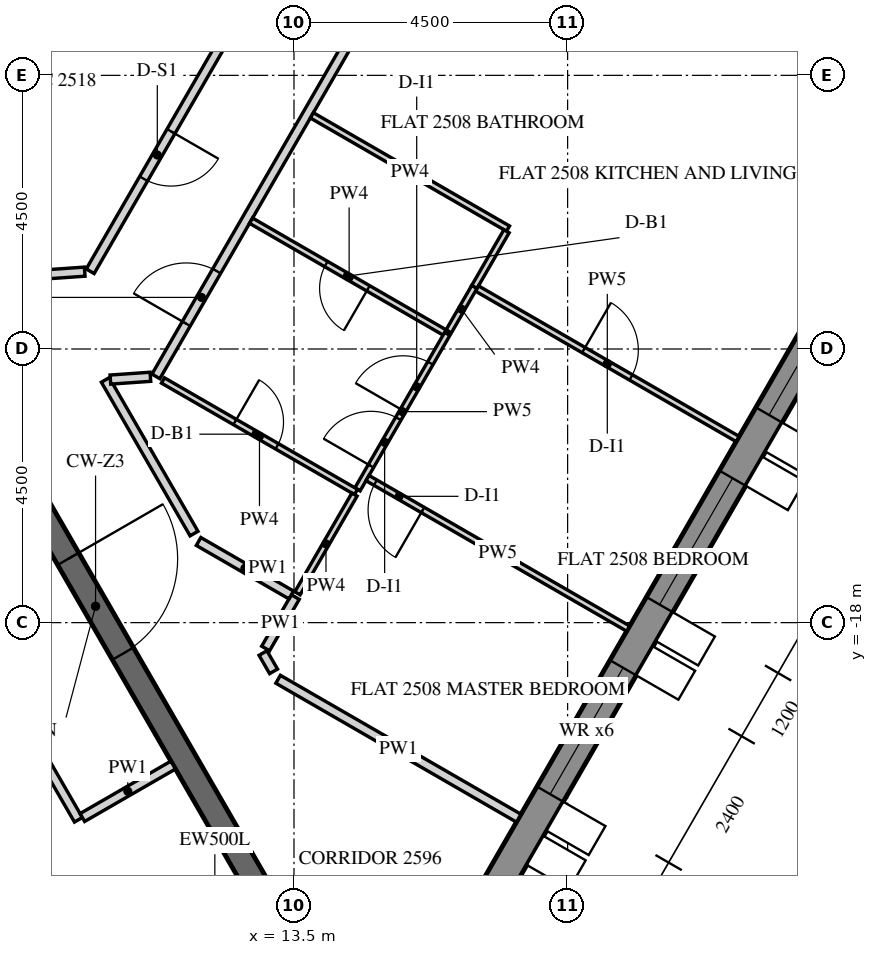
"""IFC4 building model, lengths in metres.
Left out: names, types, materials, properties, quantities, classifications, styles, units other than length and angle.
Written with IfcOpenShell. Run it as: python <this file> out.ifc"""

import sys

from ifc_helpers import new_model, si_unit, direction, frame, frame_2d, origin, place, context, subcontext, project, spatial, polyline, rectangle, outline, extrude, element, fill, save


model = new_model("IFC4")
c1 = context("Model", 3, precision=1e-05, world=origin(), true_north=direction((0.0, 1.0)))
c2 = subcontext(c1, "Body", "Model", "MODEL_VIEW")
j1 = project(units=[si_unit("LENGTHUNIT", "METRE"), si_unit("PLANEANGLEUNIT", "RADIAN")], contexts=[c1])
p1 = place(None, origin())
s1 = spatial("IfcSite", under=j1, at=p1, CompositionType="ELEMENT")
p2 = place(p1, origin())
s2 = spatial("IfcBuilding", under=s1, at=p2, CompositionType="ELEMENT")
p3 = place(p2, frame((0.0, 0.0, 314.7)))
s3 = spatial("IfcBuildingStorey", under=s2, at=p3, CompositionType="ELEMENT", Elevation=314.7)
p4 = place(p3, frame((16.451, -23.005, -0.15), z_axis=(0.0, 0.0, 1.0), x_axis=(0.500003737743, 0.866023245787, 0.0)))
e1 = element("IfcWall", 1, at=p4, inside=s3, PredefinedType="SOLIDWALL", context=c2, shape_type="SweptSolid", body=[
    extrude(outline(polyline([(-0.021, -0.25), (25.468, -0.25), (25.421, 0.25), (0.021, 0.25), (-0.021, -0.25)])), origin(), (0.0, 0.0, 1.0), 3.9),
])
p5 = place(p4, frame((2.522, 0.0, 0.75)))
e2 = element("IfcOpeningElement", 2, at=p5, cuts=e1, PredefinedType="OPENING", context=c2, shape_type="SweptSolid", body=[
    extrude(rectangle(XDim=2.4, YDim=2.7, at=frame_2d((1.2, 1.35))), frame((0.0, 0.26, 0.0), z_axis=(0.0, -1.0, 0.0), x_axis=(1.0, 0.0, 0.0)), (0.0, 0.0, 1.0), 0.52),
])
p6 = place(p4, frame((6.122, 0.0, 0.75)))
e3 = element("IfcOpeningElement", 3, at=p6, cuts=e1, PredefinedType="OPENING", context=c2, shape_type="SweptSolid", body=[
    extrude(rectangle(XDim=2.4, YDim=2.7, at=frame_2d((1.2, 1.35))), frame((0.0, 0.26, 0.0), z_axis=(0.0, -1.0, 0.0), x_axis=(1.0, 0.0, 0.0)), (0.0, 0.0, 1.0), 0.52),
])
p7 = place(p4, frame((9.722, 0.0, 0.75)))
e4 = element("IfcOpeningElement", 4, at=p7, cuts=e1, PredefinedType="OPENING", context=c2, shape_type="SweptSolid", body=[
    extrude(rectangle(XDim=2.4, YDim=2.7, at=frame_2d((1.2, 1.35))), frame((0.0, 0.26, 0.0), z_axis=(0.0, -1.0, 0.0), x_axis=(1.0, 0.0, 0.0)), (0.0, 0.0, 1.0), 0.52),
])
p8 = place(p4, frame((13.323, 0.0, 0.75)))
e5 = element("IfcOpeningElement", 5, at=p8, cuts=e1, PredefinedType="OPENING", context=c2, shape_type="SweptSolid", body=[
    extrude(rectangle(XDim=2.4, YDim=2.7, at=frame_2d((1.2, 1.35))), frame((0.0, 0.26, 0.0), z_axis=(0.0, -1.0, 0.0), x_axis=(1.0, 0.0, 0.0)), (0.0, 0.0, 1.0), 0.52),
])
p9 = place(p4, frame((16.922, 0.0, 0.75)))
e6 = element("IfcOpeningElement", 6, at=p9, cuts=e1, PredefinedType="OPENING", context=c2, shape_type="SweptSolid", body=[
    extrude(rectangle(XDim=2.4, YDim=2.7, at=frame_2d((1.2, 1.35))), frame((0.0, 0.26, 0.0), z_axis=(0.0, -1.0, 0.0), x_axis=(1.0, 0.0, 0.0)), (0.0, 0.0, 1.0), 0.52),
])
p10 = place(p4, frame((20.522, 0.0, 0.75)))
e7 = element("IfcOpeningElement", 7, at=p10, cuts=e1, PredefinedType="OPENING", context=c2, shape_type="SweptSolid", body=[
    extrude(rectangle(XDim=2.4, YDim=2.7, at=frame_2d((1.2, 1.35))), frame((0.0, 0.26, 0.0), z_axis=(0.0, -1.0, 0.0), x_axis=(1.0, 0.0, 0.0)), (0.0, 0.0, 1.0), 0.52),
])
p11 = place(p3, frame((6.235, -10.8, -0.15), z_axis=(0.0, 0.0, 1.0), x_axis=(0.499996419489, 0.866027470984, 0.0)))
e8 = element("IfcWall", 8, at=p11, inside=s3, PredefinedType="SHEAR", context=c2, shape_type="SweptSolid", body=[
    extrude(outline(polyline([(-0.115, -0.2), (12.586, -0.2), (12.355, 0.2), (0.115, 0.2), (-0.115, -0.2)])), origin(), (0.0, 0.0, 1.0), 3.9),
])
p12 = place(p11, frame((5.364, 0.0, 0.15)))
e9 = element("IfcOpeningElement", 9, at=p12, cuts=e8, PredefinedType="OPENING", context=c2, shape_type="SweptSolid", body=[
    extrude(rectangle(XDim=1.8, YDim=2.4, at=frame_2d((0.9, 1.2))), frame((0.0, 0.21, 0.0), z_axis=(0.0, -1.0, 0.0), x_axis=(1.0, 0.0, 0.0)), (0.0, 0.0, 1.0), 0.42),
])
p13 = place(p3, frame((6.351, -11.0, -0.15), z_axis=(0.0, 0.0, 1.0), x_axis=(0.499998894578, -0.866026041999, 0.0)))
e10 = element("IfcWall", 10, at=p13, inside=s3, PredefinedType="SHEAR", context=c2, shape_type="SweptSolid", body=[
    extrude(rectangle(XDim=15.544, YDim=0.4, at=frame_2d((7.772, 0.0))), origin(), (0.0, 0.0, 1.0), 3.9),
])
p14 = place(p13, frame((6.872, 0.0, 0.15)))
e11 = element("IfcOpeningElement", 11, at=p14, cuts=e10, PredefinedType="OPENING", context=c2, shape_type="SweptSolid", body=[
    extrude(rectangle(XDim=1.8, YDim=2.4, at=frame_2d((0.9, 1.2))), frame((0.0, 0.21, 0.0), z_axis=(0.0, -1.0, 0.0), x_axis=(1.0, 0.0, 0.0)), (0.0, 0.0, 1.0), 0.42),
])
p15 = place(p3, frame((6.0, -14.392, 0.0), z_axis=(0.0, 0.0, 1.0), x_axis=(0.499999400414, -0.866025749955, 0.0)))
e12 = element("IfcWall", 12, at=p15, inside=s3, PredefinedType="PARTITIONING", context=c2, shape_type="SweptSolid", body=[
    extrude(rectangle(XDim=7.911, YDim=0.15, at=frame_2d((3.955, 0.0))), origin(), (0.0, 0.0, 1.0), 2.988),
])
p16 = place(p3, frame((10.02, -21.205, 0.0), z_axis=(0.0, 0.0, 1.0), x_axis=(0.866074815912, 0.499914405916, 0.0)))
e13 = element("IfcWall", 13, at=p16, inside=s3, PredefinedType="PARTITIONING", context=c2, shape_type="SweptSolid", body=[
    extrude(rectangle(XDim=1.725, YDim=0.15, at=frame_2d((0.862, 0.0))), origin(), (0.0, 0.0, 1.0), 2.988),
])
p17 = place(p3, frame((11.229, -13.951, 0.0), z_axis=(0.0, 0.0, 1.0), x_axis=(0.499997948852, 0.866026588012, 0.0)))
e14 = element("IfcWall", 14, at=p17, inside=s3, PredefinedType="PARTITIONING", context=c2, shape_type="SweptSolid", body=[
    extrude(rectangle(XDim=14.677, YDim=0.15, at=frame_2d((7.339, 0.0))), origin(), (0.0, 0.0, 1.0), 2.988),
])
p18 = place(p17, frame((1.0, 0.0, 0.0)))
e15 = element("IfcOpeningElement", 15, at=p18, cuts=e14, PredefinedType="OPENING", context=c2, shape_type="SweptSolid", body=[
    extrude(rectangle(XDim=1.0, YDim=2.1, at=frame_2d((0.5, 1.05))), frame((0.0, 0.085, 0.0), z_axis=(0.0, -1.0, 0.0), x_axis=(1.0, 0.0, 0.0)), (0.0, 0.0, 1.0), 0.17),
])
p19 = place(p17, frame((13.527, 0.0, 0.0)))
e16 = element("IfcOpeningElement", 16, at=p19, cuts=e14, PredefinedType="OPENING", context=c2, shape_type="SweptSolid", body=[
    extrude(rectangle(XDim=1.0, YDim=2.1, at=frame_2d((0.5, 1.05))), frame((0.0, 0.085, 0.0), z_axis=(0.0, -1.0, 0.0), x_axis=(1.0, 0.0, 0.0)), (0.0, 0.0, 1.0), 0.17),
])
p20 = place(p3, frame((17.196, -21.216, 0.0), z_axis=(0.0, 0.0, 1.0), x_axis=(-0.866028083473, 0.499995358614, 0.0)))
e17 = element("IfcWall", 17, at=p20, inside=s3, PredefinedType="PARTITIONING", context=c2, shape_type="SweptSolid", body=[
    extrude(rectangle(XDim=4.569, YDim=0.15, at=frame_2d((2.284, 0.0))), origin(), (0.0, 0.0, 1.0), 2.988),
])
p21 = place(p3, frame((13.164, -18.801, 0.0), z_axis=(0.0, 0.0, 1.0), x_axis=(-0.499762962979, 0.866162213927, 0.0)))
e18 = element("IfcWall", 18, at=p21, inside=s3, PredefinedType="PARTITIONING", context=c2, shape_type="SweptSolid", body=[
    extrude(rectangle(XDim=0.348, YDim=0.15, at=frame_2d((0.174, 0.0))), origin(), (0.0, 0.0, 1.0), 2.988),
])
p22 = place(p3, frame((13.034, -18.425, 0.0), z_axis=(0.0, 0.0, 1.0), x_axis=(0.500011000363, 0.866019052629, 0.0)))
e19 = element("IfcWall", 19, at=p22, inside=s3, PredefinedType="PARTITIONING", context=c2, shape_type="SweptSolid", body=[
    extrude(rectangle(XDim=0.977, YDim=0.15, at=frame_2d((0.488, 0.0))), origin(), (0.0, 0.0, 1.0), 2.988),
])
p23 = place(p3, frame((13.455, -17.545, 0.0), z_axis=(0.0, 0.0, 1.0), x_axis=(-0.866074688284, 0.499914627025, 0.0)))
e20 = element("IfcWall", 20, at=p23, inside=s3, PredefinedType="PARTITIONING", context=c2, shape_type="SweptSolid", body=[
    extrude(rectangle(XDim=1.76, YDim=0.15, at=frame_2d((0.88, 0.0))), origin(), (0.0, 0.0, 1.0), 2.988),
])
p24 = place(p3, frame((11.856, -16.536, 0.0), z_axis=(0.0, 0.0, 1.0), x_axis=(-0.49996389635, 0.866046247233, 0.0)))
e21 = element("IfcWall", 21, at=p24, inside=s3, PredefinedType="PARTITIONING", context=c2, shape_type="SweptSolid", body=[
    extrude(rectangle(XDim=2.918, YDim=0.15, at=frame_2d((1.459, 0.0))), origin(), (0.0, 0.0, 1.0), 2.988),
])
p25 = place(p3, frame((10.481, -14.003, 0.0), z_axis=(0.0, 0.0, 1.0), x_axis=(0.997577490052, 0.06956400895, 0.0)))
e22 = element("IfcWall", 22, at=p25, inside=s3, PredefinedType="PARTITIONING", context=c2, shape_type="SweptSolid", body=[
    extrude(rectangle(XDim=0.66, YDim=0.15, at=frame_2d((0.33, 0.0))), origin(), (0.0, 0.0, 1.0), 2.988),
])
p26 = place(p3, frame((12.356, -8.399, 0.0), z_axis=(0.0, 0.0, 1.0), x_axis=(-0.499993756358, -0.866029008523, 0.0)))
e23 = element("IfcWall", 23, at=p26, inside=s3, PredefinedType="PARTITIONING", context=c2, shape_type="SweptSolid", body=[
    extrude(rectangle(XDim=4.414, YDim=0.15, at=frame_2d((2.207, 0.0))), origin(), (0.0, 0.0, 1.0), 2.988),
])
p27 = place(p26, frame((1.757, 0.0, 0.0)))
e24 = element("IfcOpeningElement", 24, at=p27, cuts=e23, PredefinedType="OPENING", context=c2, shape_type="SweptSolid", body=[
    extrude(rectangle(XDim=0.9, YDim=2.1, at=frame_2d((0.45, 1.05))), frame((0.0, 0.085, 0.0), z_axis=(0.0, -1.0, 0.0), x_axis=(1.0, 0.0, 0.0)), (0.0, 0.0, 1.0), 0.17),
])
p28 = place(p3, frame((10.059, -12.228, 0.0), z_axis=(0.0, 0.0, 1.0), x_axis=(-0.99755845504, -0.069836443057, 0.0)))
e25 = element("IfcWall", 25, at=p28, inside=s3, PredefinedType="PARTITIONING", context=c2, shape_type="SweptSolid", body=[
    extrude(rectangle(XDim=0.664, YDim=0.15, at=frame_2d((0.332, 0.0))), origin(), (0.0, 0.0, 1.0), 2.988),
])
p29 = place(p3, frame((13.794, -9.658, 0.0), z_axis=(0.0, 0.0, 1.0), x_axis=(0.866028424924, -0.499994767197, 0.0)))
e26 = element("IfcWall", 26, at=p29, inside=s3, PredefinedType="PARTITIONING", context=c2, shape_type="SweptSolid", body=[
    extrude(rectangle(XDim=3.725, YDim=0.1, at=frame_2d((1.863, 0.0))), origin(), (0.0, 0.0, 1.0), 2.988),
])
p30 = place(p3, frame((16.995, -11.564, 0.0), z_axis=(0.0, 0.0, 1.0), x_axis=(-0.50002815445, -0.866009148195, 0.0)))
e27 = element("IfcWall", 27, at=p30, inside=s3, PredefinedType="PARTITIONING", context=c2, shape_type="SweptSolid", body=[
    extrude(rectangle(XDim=1.06, YDim=0.1, at=frame_2d((0.53, 0.0))), origin(), (0.0, 0.0, 1.0), 2.988),
])
p31 = place(p3, frame((16.509, -12.505, 0.0), z_axis=(0.0, 0.0, 1.0), x_axis=(0.866018855338, -0.500011342071, 0.0)))
e28 = element("IfcWall", 28, at=p31, inside=s3, PredefinedType="PARTITIONING", context=c2, shape_type="SweptSolid", body=[
    extrude(rectangle(XDim=4.95, YDim=0.1, at=frame_2d((2.475, 0.0))), origin(), (0.0, 0.0, 1.0), 2.988),
])
p32 = place(p31, frame((2.025, 0.0, 0.0)))
e29 = element("IfcOpeningElement", 29, at=p32, cuts=e28, PredefinedType="OPENING", context=c2, shape_type="SweptSolid", body=[
    extrude(rectangle(XDim=0.9, YDim=2.1, at=frame_2d((0.45, 1.05))), frame((0.0, 0.06, 0.0), z_axis=(0.0, -1.0, 0.0), x_axis=(1.0, 0.0, 0.0)), (0.0, 0.0, 1.0), 0.12),
])
p33 = place(p3, frame((24.396, -8.745, 0.0), z_axis=(0.0, 0.0, 1.0), x_axis=(-0.866018297078, 0.500012308975, 0.0)))
e30 = element("IfcWall", 30, at=p33, inside=s3, PredefinedType="PARTITIONING", context=c2, shape_type="SweptSolid", body=[
    extrude(rectangle(XDim=8.725, YDim=0.18, at=frame_2d((4.362, 0.0))), origin(), (0.0, 0.0, 1.0), 2.988),
])
p34 = place(p3, frame((16.02, -13.253, 0.0), z_axis=(0.0, 0.0, 1.0), x_axis=(-0.866028424924, 0.499994767197, 0.0)))
e31 = element("IfcWall", 31, at=p34, inside=s3, PredefinedType="PARTITIONING", context=c2, shape_type="SweptSolid", body=[
    extrude(rectangle(XDim=3.725, YDim=0.1, at=frame_2d((1.863, 0.0))), origin(), (0.0, 0.0, 1.0), 2.988),
])
p35 = place(p34, frame((1.5, 0.0, 0.0)))
e32 = element("IfcOpeningElement", 32, at=p35, cuts=e31, PredefinedType="OPENING", context=c2, shape_type="SweptSolid", body=[
    extrude(rectangle(XDim=0.8, YDim=2.1, at=frame_2d((0.4, 1.05))), frame((0.0, 0.06, 0.0), z_axis=(0.0, -1.0, 0.0), x_axis=(1.0, 0.0, 0.0)), (0.0, 0.0, 1.0), 0.12),
])
p36 = place(p3, frame((14.544, -15.809, 0.0), z_axis=(0.0, 0.0, 1.0), x_axis=(0.500032473623, 0.866006654318, 0.0)))
e33 = element("IfcWall", 33, at=p36, inside=s3, PredefinedType="PARTITIONING", context=c2, shape_type="SweptSolid", body=[
    extrude(rectangle(XDim=2.954, YDim=0.1, at=frame_2d((1.477, 0.0))), origin(), (0.0, 0.0, 1.0), 2.988),
])
p37 = place(p36, frame((0.444, 0.0, 0.0)))
e34 = element("IfcOpeningElement", 34, at=p37, cuts=e33, PredefinedType="OPENING", context=c2, shape_type="SweptSolid", body=[
    extrude(rectangle(XDim=0.9, YDim=2.1, at=frame_2d((0.45, 1.05))), frame((0.0, 0.06, 0.0), z_axis=(0.0, -1.0, 0.0), x_axis=(1.0, 0.0, 0.0)), (0.0, 0.0, 1.0), 0.12),
])
p38 = place(p36, frame((1.498, 0.0, 0.0)))
e35 = element("IfcOpeningElement", 35, at=p38, cuts=e33, PredefinedType="OPENING", context=c2, shape_type="SweptSolid", body=[
    extrude(rectangle(XDim=0.9, YDim=2.1, at=frame_2d((0.45, 1.05))), frame((0.0, 0.06, 0.0), z_axis=(0.0, -1.0, 0.0), x_axis=(1.0, 0.0, 0.0)), (0.0, 0.0, 1.0), 0.12),
])
p39 = place(p3, frame((11.345, -14.018, 0.0), z_axis=(0.0, 0.0, 1.0), x_axis=(0.866050287132, -0.499956898301, 0.0)))
e36 = element("IfcWall", 36, at=p39, inside=s3, PredefinedType="PARTITIONING", context=c2, shape_type="SweptSolid", body=[
    extrude(rectangle(XDim=3.666, YDim=0.1, at=frame_2d((1.833, 0.0))), origin(), (0.0, 0.0, 1.0), 2.988),
])
p40 = place(p39, frame((1.366, 0.0, 0.0)))
e37 = element("IfcOpeningElement", 37, at=p40, cuts=e36, PredefinedType="OPENING", context=c2, shape_type="SweptSolid", body=[
    extrude(rectangle(XDim=0.8, YDim=2.1, at=frame_2d((0.4, 1.05))), frame((0.0, 0.06, 0.0), z_axis=(0.0, -1.0, 0.0), x_axis=(1.0, 0.0, 0.0)), (0.0, 0.0, 1.0), 0.12),
])
p41 = place(p3, frame((16.044, -13.211, 0.0), z_axis=(0.0, 0.0, 1.0), x_axis=(0.499997969693, 0.866026575979, 0.0)))
e38 = element("IfcWall", 38, at=p41, inside=s3, PredefinedType="PARTITIONING", context=c2, shape_type="SweptSolid", body=[
    extrude(rectangle(XDim=0.844, YDim=0.1, at=frame_2d((0.422, 0.0))), origin(), (0.0, 0.0, 1.0), 2.988),
])
p42 = place(p3, frame((18.996, -18.098, 0.0), z_axis=(0.0, 0.0, 1.0), x_axis=(-0.866018855338, 0.500011342071, 0.0)))
e39 = element("IfcWall", 39, at=p42, inside=s3, PredefinedType="PARTITIONING", context=c2, shape_type="SweptSolid", body=[
    extrude(rectangle(XDim=4.95, YDim=0.1, at=frame_2d((2.475, 0.0))), origin(), (0.0, 0.0, 1.0), 2.988),
])
p43 = place(p42, frame((3.9, 0.0, 0.0)))
e40 = element("IfcOpeningElement", 40, at=p43, cuts=e39, PredefinedType="OPENING", context=c2, shape_type="SweptSolid", body=[
    extrude(rectangle(XDim=0.9, YDim=2.1, at=frame_2d((0.45, 1.05))), frame((0.0, 0.06, 0.0), z_axis=(0.0, -1.0, 0.0), x_axis=(1.0, 0.0, 0.0)), (0.0, 0.0, 1.0), 0.12),
])
p44 = place(p3, frame((14.495, -15.894, 0.0), z_axis=(0.0, 0.0, 1.0), x_axis=(-0.500004234368, -0.866022959057, 0.0)))
e41 = element("IfcWall", 41, at=p44, inside=s3, PredefinedType="PARTITIONING", context=c2, shape_type="SweptSolid", body=[
    extrude(rectangle(XDim=1.875, YDim=0.1, at=frame_2d((0.938, 0.0))), origin(), (0.0, 0.0, 1.0), 2.988),
])
p45 = place(p5, frame((0.0, 0.18, 0.0)))
e42 = element("IfcWindow", 42, at=p45, inside=s3, PartitioningType="DOUBLE_PANEL_VERTICAL", PredefinedType="WINDOW", context=c2, shape_type="SweptSolid", body=[
    extrude(rectangle(XDim=2.4, YDim=2.7, at=frame_2d((1.2, 1.35))), frame((0.0, 0.03, 0.0), z_axis=(0.0, -1.0, 0.0), x_axis=(1.0, 0.0, 0.0)), (0.0, 0.0, 1.0), 0.06),
])
fill(e2, e42)
p46 = place(p6, frame((0.0, 0.18, 0.0)))
e43 = element("IfcWindow", 43, at=p46, inside=s3, PartitioningType="DOUBLE_PANEL_VERTICAL", PredefinedType="WINDOW", context=c2, shape_type="SweptSolid", body=[
    extrude(rectangle(XDim=2.4, YDim=2.7, at=frame_2d((1.2, 1.35))), frame((0.0, 0.03, 0.0), z_axis=(0.0, -1.0, 0.0), x_axis=(1.0, 0.0, 0.0)), (0.0, 0.0, 1.0), 0.06),
])
fill(e3, e43)
p47 = place(p7, frame((0.0, 0.18, 0.0)))
e44 = element("IfcWindow", 44, at=p47, inside=s3, PartitioningType="DOUBLE_PANEL_VERTICAL", PredefinedType="WINDOW", context=c2, shape_type="SweptSolid", body=[
    extrude(rectangle(XDim=2.4, YDim=2.7, at=frame_2d((1.2, 1.35))), frame((0.0, 0.03, 0.0), z_axis=(0.0, -1.0, 0.0), x_axis=(1.0, 0.0, 0.0)), (0.0, 0.0, 1.0), 0.06),
])
fill(e4, e44)
p48 = place(p14, origin())
e45 = element("IfcDoor", 45, at=p48, inside=s3, OperationType="DOUBLE_DOOR_SINGLE_SWING", PredefinedType="DOOR", context=c2, shape_type="SweptSolid", body=[
    extrude(rectangle(XDim=1.8, YDim=2.4, at=frame_2d((0.9, 1.2))), frame((0.0, 0.025, 0.0), z_axis=(0.0, -1.0, 0.0), x_axis=(1.0, 0.0, 0.0)), (0.0, 0.0, 1.0), 0.05),
])
fill(e11, e45)
p49 = place(p18, origin())
e46 = element("IfcDoor", 46, at=p49, inside=s3, OperationType="SINGLE_SWING_RIGHT", PredefinedType="DOOR", context=c2, shape_type="SweptSolid", body=[
    extrude(rectangle(XDim=1.0, YDim=2.1, at=frame_2d((0.5, 1.05))), frame((0.0, 0.025, 0.0), z_axis=(0.0, -1.0, 0.0), x_axis=(1.0, 0.0, 0.0)), (0.0, 0.0, 1.0), 0.05),
])
fill(e15, e46)
p50 = place(p35, origin())
e47 = element("IfcDoor", 47, at=p50, inside=s3, OperationType="SINGLE_SWING_LEFT", PredefinedType="DOOR", context=c2, shape_type="SweptSolid", body=[
    extrude(rectangle(XDim=0.8, YDim=2.1, at=frame_2d((0.4, 1.05))), frame((0.0, 0.025, 0.0), z_axis=(0.0, -1.0, 0.0), x_axis=(1.0, 0.0, 0.0)), (0.0, 0.0, 1.0), 0.05),
])
fill(e32, e47)
p51 = place(p37, origin())
e48 = element("IfcDoor", 48, at=p51, inside=s3, OperationType="SINGLE_SWING_LEFT", PredefinedType="DOOR", context=c2, shape_type="SweptSolid", body=[
    extrude(rectangle(XDim=0.9, YDim=2.1, at=frame_2d((0.45, 1.05))), frame((0.0, 0.025, 0.0), z_axis=(0.0, -1.0, 0.0), x_axis=(1.0, 0.0, 0.0)), (0.0, 0.0, 1.0), 0.05),
])
fill(e34, e48)
p52 = place(p43, origin())
e49 = element("IfcDoor", 49, at=p52, inside=s3, OperationType="SINGLE_SWING_RIGHT", PredefinedType="DOOR", context=c2, shape_type="SweptSolid", body=[
    extrude(rectangle(XDim=0.9, YDim=2.1, at=frame_2d((0.45, 1.05))), frame((0.0, 0.025, 0.0), z_axis=(0.0, -1.0, 0.0), x_axis=(1.0, 0.0, 0.0)), (0.0, 0.0, 1.0), 0.05),
])
fill(e40, e49)
p53 = place(p38, origin())
e50 = element("IfcDoor", 50, at=p53, inside=s3, OperationType="SINGLE_SWING_LEFT", PredefinedType="DOOR", context=c2, shape_type="SweptSolid", body=[
    extrude(rectangle(XDim=0.9, YDim=2.1, at=frame_2d((0.45, 1.05))), frame((0.0, 0.025, 0.0), z_axis=(0.0, -1.0, 0.0), x_axis=(1.0, 0.0, 0.0)), (0.0, 0.0, 1.0), 0.05),
])
fill(e35, e50)
p54 = place(p40, origin())
e51 = element("IfcDoor", 51, at=p54, inside=s3, OperationType="SINGLE_SWING_RIGHT", PredefinedType="DOOR", context=c2, shape_type="SweptSolid", body=[
    extrude(rectangle(XDim=0.8, YDim=2.1, at=frame_2d((0.4, 1.05))), frame((0.0, 0.025, 0.0), z_axis=(0.0, -1.0, 0.0), x_axis=(1.0, 0.0, 0.0)), (0.0, 0.0, 1.0), 0.05),
])
fill(e37, e51)
p55 = place(p32, origin())
e52 = element("IfcDoor", 52, at=p55, inside=s3, OperationType="SINGLE_SWING_RIGHT", PredefinedType="DOOR", context=c2, shape_type="SweptSolid", body=[
    extrude(rectangle(XDim=0.9, YDim=2.1, at=frame_2d((0.45, 1.05))), frame((0.0, 0.025, 0.0), z_axis=(0.0, -1.0, 0.0), x_axis=(1.0, 0.0, 0.0)), (0.0, 0.0, 1.0), 0.05),
])
fill(e29, e52)
p56 = place(p27, origin())
e53 = element("IfcDoor", 53, at=p56, inside=s3, OperationType="SINGLE_SWING_LEFT", PredefinedType="DOOR", context=c2, shape_type="SweptSolid", body=[
    extrude(rectangle(XDim=0.9, YDim=2.1, at=frame_2d((0.45, 1.05))), frame((0.0, 0.025, 0.0), z_axis=(0.0, -1.0, 0.0), x_axis=(1.0, 0.0, 0.0)), (0.0, 0.0, 1.0), 0.05),
])
fill(e24, e53)
save(model, sys.argv[1])
